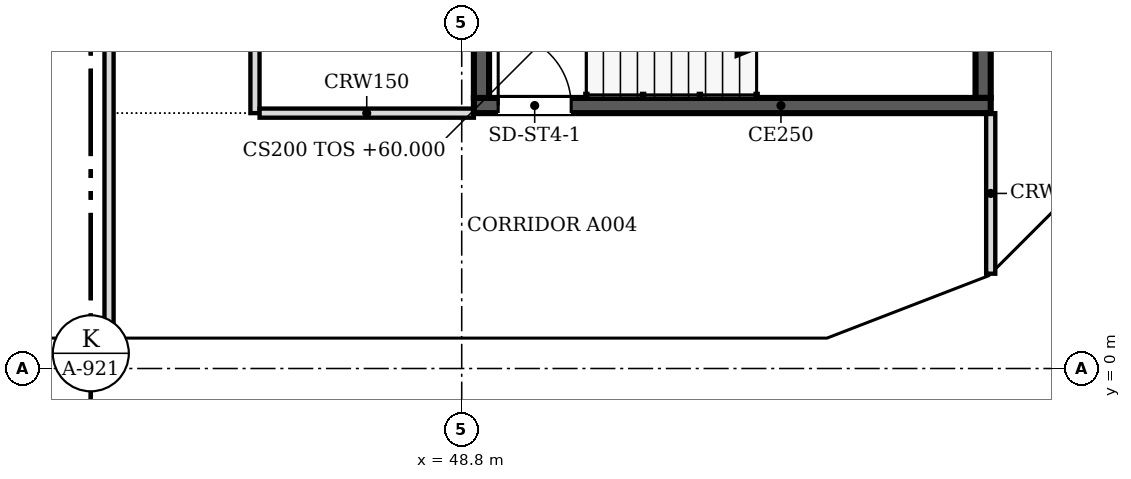
"""IFC4 building model, lengths in metres.
Left out: names, types, materials, properties, quantities, classifications, styles, units other than length and angle.
Written with IfcOpenShell. Run it as: python <this file> out.ifc"""

import sys

from ifc_helpers import new_model, si_unit, direction, frame, frame_2d, origin, place, context, subcontext, project, spatial, polyline, rectangle, outline, extrude, faceted_brep, source, transform, mapped, element, fill, save


model = new_model("IFC4")
c1 = context("Model", 3, precision=1e-05, world=origin(), true_north=direction((0.0, 1.0)))
c2 = subcontext(c1, "Body", "Model", "MODEL_VIEW")
j1 = project(units=[si_unit("LENGTHUNIT", "METRE"), si_unit("PLANEANGLEUNIT", "RADIAN")], contexts=[c1])
p1 = place(None, origin())
s1 = spatial("IfcSite", under=j1, at=p1, CompositionType="ELEMENT")
p2 = place(p1, origin())
s2 = spatial("IfcBuilding", under=s1, at=p2, CompositionType="ELEMENT")
p3 = place(p2, frame((0.0, 0.0, 60.0)))
s3 = spatial("IfcBuildingStorey", under=s2, at=p3, CompositionType="ELEMENT", Elevation=60.0)
m1 = source(origin(), c2, "Body", "Brep", [
    faceted_brep([(3.05, -0.25, 0.0), (6.1, -0.25, 3.8), (6.1, -0.25, 3.8), (3.05, -0.25, 7.6), (0.0, -0.25, 3.8), (0.0, 0.25, 3.8), (3.05, 0.25, 7.6), (6.1, 0.25, 3.8), (6.1, 0.25, 3.8), (3.05, 0.25, 0.0)], [[[0, 1, 2, 3, 4]], [[5, 6, 7, 8, 9]], [[9, 8, 1, 0]], [[7, 6, 3, 2]], [[6, 5, 4, 3]], [[5, 9, 0, 4]], [[1, 8, 7, 2]]]),
])
p4 = place(p3, frame((36.6, 0.25, -3.8), z_axis=(0.0, 0.0, 1.0), x_axis=(1.0, 0.0, 0.0)))
e1 = element("IfcWall", 1, at=p4, inside=s3, PredefinedType="SOLIDWALL", context=c2, shape_type="MappedRepresentation", body=[
    mapped(m1, transform((0.0, 0.0, 0.0), scale=1.0)),
])
m2 = source(origin(), c2, "Body", "SweptSolid", [
    extrude(outline(polyline([(3.05, 0.399), (5.78, 3.8), (3.05, 7.201), (0.321, 3.8), (3.05, 0.399)])), frame((0.0, 0.26, 0.0), z_axis=(0.0, -1.0, 0.0), x_axis=(1.0, 0.0, 0.0)), (0.0, 0.0, 1.0), 0.52),
])
p5 = place(p4, origin())
e2 = element("IfcOpeningElement", 2, at=p5, cuts=e1, PredefinedType="OPENING", context=c2, shape_type="MappedRepresentation", body=[
    mapped(m2, transform((0.0, 0.0, 0.0), scale=1.0)),
])
m3 = source(origin(), c2, "Body", "SweptSolid", [
    extrude(outline(polyline([(3.05, 0.0), (6.1, 3.8), (3.05, 7.6), (0.0, 3.8), (3.05, 0.0)])), frame((0.0, 0.25, 0.0), z_axis=(0.0, -1.0, 0.0), x_axis=(1.0, 0.0, 0.0)), (0.0, 0.0, 1.0), 0.5),
])
p6 = place(p3, frame((42.7, 0.25, -3.8), z_axis=(0.0, 0.0, 1.0), x_axis=(1.0, 0.0, 0.0)))
e3 = element("IfcWall", 3, at=p6, inside=s3, PredefinedType="SOLIDWALL", context=c2, shape_type="MappedRepresentation", body=[
    mapped(m3, transform((0.0, 0.0, 0.0), scale=1.0)),
])
p7 = place(p6, origin())
e4 = element("IfcOpeningElement", 4, at=p7, cuts=e3, PredefinedType="OPENING", context=c2, shape_type="MappedRepresentation", body=[
    mapped(m2, transform((0.0, 0.0, 0.0), scale=1.0)),
])
m4 = source(origin(), c2, "Body", "Brep", [
    faceted_brep([(3.05, -0.25, 0.0), (6.053, -0.25, 3.8), (3.05, -0.25, 7.6), (0.0, -0.25, 3.8), (0.0, 0.25, 3.8), (3.05, 0.25, 7.6), (6.007, 0.25, 3.859), (6.007, 0.25, 3.741), (3.05, 0.25, 0.0), (6.053, 0.0, 3.8)], [[[0, 1, 2, 3]], [[4, 5, 6, 7, 8]], [[8, 7, 9, 1, 0]], [[6, 5, 2, 1, 9]], [[5, 4, 3, 2]], [[4, 8, 0, 3]], [[9, 7, 6]]]),
])
p8 = place(p3, frame((48.8, 0.25, -3.8), z_axis=(0.0, 0.0, 1.0), x_axis=(1.0, 0.0, 0.0)))
e5 = element("IfcWall", 5, at=p8, inside=s3, PredefinedType="SOLIDWALL", context=c2, shape_type="MappedRepresentation", body=[
    mapped(m4, transform((0.0, 0.0, 0.0), scale=1.0)),
])
m5 = source(origin(), c2, "Body", "SweptSolid", [
    extrude(outline(polyline([(3.049, 0.401), (5.735, 3.8), (3.049, 7.199), (0.321, 3.8), (3.049, 0.401)])), frame((0.0, 0.26, 0.0), z_axis=(0.0, -1.0, 0.0), x_axis=(1.0, 0.0, 0.0)), (0.0, 0.0, 1.0), 0.52),
])
p9 = place(p8, origin())
e6 = element("IfcOpeningElement", 6, at=p9, cuts=e5, PredefinedType="OPENING", context=c2, shape_type="MappedRepresentation", body=[
    mapped(m5, transform((0.0, 0.0, 0.0), scale=1.0)),
])
m6 = source(origin(), c2, "Body", "Brep", [
    faceted_brep([(2.95, -0.25, 0.0), (3.003, -0.25, 0.068), (3.003, -0.25, 7.532), (2.95, -0.25, 7.6), (0.0, -0.25, 3.8), (0.047, 0.25, 3.86), (2.898, 0.25, 7.532), (2.898, 0.25, 0.068), (0.047, 0.25, 3.74), (2.95, 0.0, 0.0), (2.95, 0.0, 7.6), (0.0, 0.0, 3.8)], [[[0, 1, 2, 3, 4]], [[5, 6, 7, 8]], [[1, 0, 9]], [[10, 3, 2]], [[6, 5, 11, 4, 3, 10]], [[8, 7, 9, 0, 4, 11]], [[8, 11, 5]], [[1, 9, 7, 6, 10, 2]]]),
])
p10 = place(p3, frame((54.854, 0.25, -3.8), z_axis=(0.0, 0.0, 1.0), x_axis=(0.932970071518, 0.359953949349, 0.0)))
e7 = element("IfcWall", 7, at=p10, inside=s3, PredefinedType="SOLIDWALL", context=c2, shape_type="MappedRepresentation", body=[
    mapped(m6, transform((0.0, 0.0, 0.0), scale=1.0)),
])
m7 = source(origin(), c2, "Body", "SweptSolid", [
    extrude(outline(polyline([(2.75, 6.935), (0.316, 3.8), (2.75, 0.665), (2.75, 6.935)])), frame((0.0, 0.26, 0.0), z_axis=(0.0, -1.0, 0.0), x_axis=(1.0, 0.0, 0.0)), (0.0, 0.0, 1.0), 0.52),
])
p11 = place(p10, origin())
e8 = element("IfcOpeningElement", 8, at=p11, cuts=e7, PredefinedType="OPENING", context=c2, shape_type="MappedRepresentation", body=[
    mapped(m7, transform((0.0, 0.0, 0.0), scale=1.0)),
])
m8 = source(origin(), c2, "Body", "Brep", [
    faceted_brep([(0.053, -0.25, 0.0), (2.997, -0.25, 3.8), (0.053, -0.25, 7.6), (0.0, -0.25, 7.532), (0.0, -0.25, 0.068), (0.106, 0.25, 7.532), (2.944, 0.25, 3.868), (2.944, 0.25, 3.732), (0.106, 0.25, 0.068), (2.997, 0.0, 3.8), (0.053, 0.0, 0.0), (0.053, 0.0, 7.6)], [[[0, 1, 2, 3, 4]], [[5, 6, 7, 8]], [[8, 7, 9, 1, 0, 10]], [[6, 5, 11, 2, 1, 9]], [[3, 2, 11]], [[10, 0, 4]], [[8, 10, 4, 3, 11, 5]], [[9, 7, 6]]]),
])
p12 = place(p3, frame((57.569, 1.274, -3.8), z_axis=(0.0, 0.0, 1.0), x_axis=(0.707066050402, 0.707147509625, 0.0)))
e9 = element("IfcWall", 9, at=p12, inside=s3, PredefinedType="SOLIDWALL", context=c2, shape_type="MappedRepresentation", body=[
    mapped(m8, transform((0.0, 0.0, 0.0), scale=1.0)),
])
m9 = source(origin(), c2, "Body", "SweptSolid", [
    extrude(outline(polyline([(0.253, 0.666), (2.681, 3.8), (0.253, 6.934), (0.253, 0.666)])), frame((0.0, 0.26, 0.0), z_axis=(0.0, -1.0, 0.0), x_axis=(1.0, 0.0, 0.0)), (0.0, 0.0, 1.0), 0.52),
])
p13 = place(p12, origin())
e10 = element("IfcOpeningElement", 10, at=p13, cuts=e9, PredefinedType="OPENING", context=c2, shape_type="MappedRepresentation", body=[
    mapped(m9, transform((0.0, 0.0, 0.0), scale=1.0)),
])
m10 = source(origin(), c2, "Body", "SweptSolid", [
    extrude(outline(polyline([(3.05, 0.0), (6.1, 3.8), (0.0, 3.8), (3.05, 0.0)])), frame((0.0, 0.25, 0.0), z_axis=(0.0, -1.0, 0.0), x_axis=(1.0, 0.0, 0.0)), (0.0, 0.0, 1.0), 0.5),
])
p14 = place(p3, frame((39.65, 0.25, 0.0), z_axis=(0.0, 0.0, 1.0), x_axis=(1.0, 0.0, 0.0)))
e11 = element("IfcWall", 11, at=p14, inside=s3, PredefinedType="SOLIDWALL", context=c2, shape_type="MappedRepresentation", body=[
    mapped(m10, transform((0.0, 0.0, 0.0), scale=1.0)),
])
m11 = source(origin(), c2, "Body", "SweptSolid", [
    extrude(outline(polyline([(3.05, 0.399), (5.579, 3.55), (0.521, 3.55), (3.05, 0.399)])), frame((0.0, 0.26, 0.0), z_axis=(0.0, -1.0, 0.0), x_axis=(1.0, 0.0, 0.0)), (0.0, 0.0, 1.0), 0.52),
])
p15 = place(p14, origin())
e12 = element("IfcOpeningElement", 12, at=p15, cuts=e11, PredefinedType="OPENING", context=c2, shape_type="MappedRepresentation", body=[
    mapped(m11, transform((0.0, 0.0, 0.0), scale=1.0)),
])
p16 = place(p3, frame((45.75, 0.25, 0.0), z_axis=(0.0, 0.0, 1.0), x_axis=(1.0, 0.0, 0.0)))
e13 = element("IfcWall", 13, at=p16, inside=s3, PredefinedType="SOLIDWALL", context=c2, shape_type="MappedRepresentation", body=[
    mapped(m10, transform((0.0, 0.0, 0.0), scale=1.0)),
])
p17 = place(p16, origin())
e14 = element("IfcOpeningElement", 14, at=p17, cuts=e13, PredefinedType="OPENING", context=c2, shape_type="MappedRepresentation", body=[
    mapped(m11, transform((0.0, 0.0, 0.0), scale=1.0)),
])
m12 = source(origin(), c2, "Body", "Brep", [
    faceted_brep([(3.003, -0.25, 0.0), (3.05, -0.25, 0.06), (3.05, -0.25, 3.8), (0.0, -0.25, 3.8), (0.0, 0.25, 3.8), (2.957, 0.25, 3.8), (2.957, 0.25, 0.059), (3.003, 0.0, 0.0)], [[[0, 1, 2, 3]], [[4, 5, 6]], [[1, 0, 7]], [[5, 4, 3, 2]], [[4, 6, 7, 0, 3]], [[1, 7, 6, 5, 2]]]),
])
p18 = place(p3, frame((51.85, 0.25, 0.0), z_axis=(0.0, 0.0, 1.0), x_axis=(1.0, 0.0, 0.0)))
e15 = element("IfcWall", 15, at=p18, inside=s3, PredefinedType="SOLIDWALL", context=c2, shape_type="MappedRepresentation", body=[
    mapped(m12, transform((0.0, 0.0, 0.0), scale=1.0)),
])
m13 = source(origin(), c2, "Body", "SweptSolid", [
    extrude(outline(polyline([(2.803, 3.55), (0.516, 3.55), (2.803, 0.656), (2.803, 3.55)])), frame((0.0, 0.26, 0.0), z_axis=(0.0, -1.0, 0.0), x_axis=(1.0, 0.0, 0.0)), (0.0, 0.0, 1.0), 0.52),
])
p19 = place(p18, origin())
e16 = element("IfcOpeningElement", 16, at=p19, cuts=e15, PredefinedType="OPENING", context=c2, shape_type="MappedRepresentation", body=[
    mapped(m13, transform((0.0, 0.0, 0.0), scale=1.0)),
])
m14 = source(origin(), c2, "Body", "Brep", [
    faceted_brep([(0.047, -0.25, 0.0), (2.997, -0.25, 3.8), (0.0, -0.25, 3.8), (0.0, -0.25, 0.059), (0.093, 0.25, 3.8), (2.944, 0.25, 3.8), (2.944, 0.25, 3.732), (0.093, 0.25, 0.06), (2.997, 0.0, 3.8), (0.047, 0.0, 0.0)], [[[0, 1, 2, 3]], [[4, 5, 6, 7]], [[7, 6, 8, 1, 0, 9]], [[5, 4, 2, 1, 8]], [[9, 0, 3]], [[7, 9, 3, 2, 4]], [[6, 5, 8]]]),
])
p20 = place(p3, frame((54.81, 0.233, 0.0), z_axis=(0.0, 0.0, 1.0), x_axis=(0.932990326376, 0.359901446078, 0.0)))
e17 = element("IfcWall", 17, at=p20, inside=s3, PredefinedType="SOLIDWALL", context=c2, shape_type="MappedRepresentation", body=[
    mapped(m14, transform((0.0, 0.0, 0.0), scale=1.0)),
])
m15 = source(origin(), c2, "Body", "SweptSolid", [
    extrude(outline(polyline([(0.247, 0.665), (2.487, 3.55), (0.247, 3.55), (0.247, 0.665)])), frame((0.0, 0.26, 0.0), z_axis=(0.0, -1.0, 0.0), x_axis=(1.0, 0.0, 0.0)), (0.0, 0.0, 1.0), 0.52),
])
p21 = place(p20, origin())
e18 = element("IfcOpeningElement", 18, at=p21, cuts=e17, PredefinedType="OPENING", context=c2, shape_type="MappedRepresentation", body=[
    mapped(m15, transform((0.0, 0.0, 0.0), scale=1.0)),
])
m16 = source(origin(), c2, "Body", "Brep", [
    faceted_brep([(2.944, -0.25, 0.0), (2.997, -0.25, 0.068), (2.997, -0.25, 3.8), (0.0, -0.25, 3.8), (0.053, 0.25, 3.8), (2.891, 0.25, 3.8), (2.891, 0.25, 0.068), (0.053, 0.25, 3.732), (2.944, 0.0, 0.0), (0.0, 0.0, 3.8)], [[[0, 1, 2, 3]], [[4, 5, 6, 7]], [[1, 0, 8]], [[5, 4, 9, 3, 2]], [[7, 6, 8, 0, 3, 9]], [[7, 9, 4]], [[1, 8, 6, 5, 2]]]),
])
p22 = place(p3, frame((57.606, 1.312, 0.0), z_axis=(0.0, 0.0, 1.0), x_axis=(0.707147509625, 0.707066050402, 0.0)))
e19 = element("IfcWall", 19, at=p22, inside=s3, PredefinedType="SOLIDWALL", context=c2, shape_type="MappedRepresentation", body=[
    mapped(m16, transform((0.0, 0.0, 0.0), scale=1.0)),
])
m17 = source(origin(), c2, "Body", "SweptSolid", [
    extrude(outline(polyline([(2.744, 3.55), (0.51, 3.55), (2.744, 0.666), (2.744, 3.55)])), frame((0.0, 0.26, 0.0), z_axis=(0.0, -1.0, 0.0), x_axis=(1.0, 0.0, 0.0)), (0.0, 0.0, 1.0), 0.52),
])
p23 = place(p22, origin())
e20 = element("IfcOpeningElement", 20, at=p23, cuts=e19, PredefinedType="OPENING", context=c2, shape_type="MappedRepresentation", body=[
    mapped(m17, transform((0.0, 0.0, 0.0), scale=1.0)),
])
p24 = place(p3, frame((57.5, 4.325, 0.0), z_axis=(0.0, 0.0, 1.0), x_axis=(-1.0, 0.0, 0.0)))
e21 = element("IfcWall", 21, at=p24, inside=s3, PredefinedType="SOLIDWALL", context=c2, shape_type="SweptSolid", body=[
    extrude(rectangle(XDim=8.5, YDim=0.25, at=frame_2d((4.25, 0.0))), origin(), (0.0, 0.0, 1.0), 3.8),
])
m18 = source(origin(), c2, "Body", "SweptSolid", [
    extrude(rectangle(XDim=1.2, YDim=2.1, at=frame_2d((0.6, 1.05))), frame((0.0, 0.135, 0.0), z_axis=(0.0, -1.0, 0.0), x_axis=(1.0, 0.0, 0.0)), (0.0, 0.0, 1.0), 0.27),
])
p25 = place(p24, frame((6.9, 0.0, 0.0)))
e22 = element("IfcOpeningElement", 22, at=p25, cuts=e21, PredefinedType="OPENING", context=c2, shape_type="MappedRepresentation", body=[
    mapped(m18, transform((0.0, 0.0, 0.0), scale=1.0)),
])
for number, where, z_axis, x_axis in (
    (23, (49.125, 4.45, 0.0), (0.0, 0.0, 1.0), (0.0, 1.0, 0.0)),
    (24, (57.375, 7.85, 0.0), (0.0, 0.0, 1.0), (0.0, -1.0, 0.0)),
):
    element("IfcWall", number, at=place(p3, frame(where, z_axis=z_axis, x_axis=x_axis)), inside=s3, PredefinedType="SOLIDWALL", context=c2, shape_type="SweptSolid", body=[
        extrude(rectangle(XDim=3.4, YDim=0.25, at=frame_2d((1.7, 0.0))), origin(), (0.0, 0.0, 1.0), 3.8),
    ])
p26 = place(p3, frame((43.0, 0.5, 0.0), z_axis=(0.0, 0.0, 1.0), x_axis=(0.0, 1.0, 0.0)))
e25 = element("IfcWall", 25, at=p26, inside=s3, PredefinedType="PARTITIONING", context=c2, shape_type="SweptSolid", body=[
    extrude(rectangle(XDim=21.424, YDim=0.15, at=frame_2d((10.712, 0.0))), origin(), (0.0, 0.0, 1.0), 2.888),
])
m19 = source(origin(), c2, "Body", "SweptSolid", [
    extrude(rectangle(XDim=1.0, YDim=2.1, at=frame_2d((0.5, 1.05))), frame((0.0, 0.085, 0.0), z_axis=(0.0, -1.0, 0.0), x_axis=(1.0, 0.0, 0.0)), (0.0, 0.0, 1.0), 0.17),
])
p27 = place(p26, frame((16.601, 0.0, 0.0)))
e26 = element("IfcOpeningElement", 26, at=p27, cuts=e25, PredefinedType="OPENING", context=c2, shape_type="MappedRepresentation", body=[
    mapped(m19, transform((0.0, 0.0, 0.0), scale=1.0)),
])
p28 = place(p26, frame((7.7, 0.0, 0.0)))
e27 = element("IfcOpeningElement", 27, at=p28, cuts=e25, PredefinedType="OPENING", context=c2, shape_type="MappedRepresentation", body=[
    mapped(m19, transform((0.0, 0.0, 0.0), scale=1.0)),
])
p29 = place(p3, frame((57.5, 1.559, 0.0), z_axis=(0.0, 0.0, 1.0), x_axis=(0.0, 1.0, 0.0)))
e28 = element("IfcWall", 28, at=p29, inside=s3, PredefinedType="PARTITIONING", context=c2, shape_type="SweptSolid", body=[
    extrude(rectangle(XDim=2.641, YDim=0.15, at=frame_2d((1.32, 0.0))), origin(), (0.0, 0.0, 1.0), 2.888),
])
p30 = place(p3, frame((45.4, 22.0, 0.0), z_axis=(0.0, 0.0, 1.0), x_axis=(0.0, -1.0, 0.0)))
e29 = element("IfcWall", 29, at=p30, inside=s3, PredefinedType="PARTITIONING", context=c2, shape_type="SweptSolid", body=[
    extrude(rectangle(XDim=17.8, YDim=0.15, at=frame_2d((8.9, 0.0))), origin(), (0.0, 0.0, 1.0), 2.888),
])
p31 = place(p30, frame((3.499, 0.0, 0.0)))
e30 = element("IfcOpeningElement", 30, at=p31, cuts=e29, PredefinedType="OPENING", context=c2, shape_type="MappedRepresentation", body=[
    mapped(m19, transform((0.0, 0.0, 0.0), scale=1.0)),
])
m20 = source(origin(), c2, "Body", "SweptSolid", [
    extrude(rectangle(XDim=0.9, YDim=2.1, at=frame_2d((0.45, 1.05))), frame((0.0, 0.085, 0.0), z_axis=(0.0, -1.0, 0.0), x_axis=(1.0, 0.0, 0.0)), (0.0, 0.0, 1.0), 0.17),
])
p32 = place(p30, frame((12.4, 0.0, 0.0)))
e31 = element("IfcOpeningElement", 31, at=p32, cuts=e29, PredefinedType="OPENING", context=c2, shape_type="MappedRepresentation", body=[
    mapped(m20, transform((0.0, 0.0, 0.0), scale=1.0)),
])
p33 = place(p3, frame((45.476, 4.2, 0.0), z_axis=(0.0, 0.0, 1.0), x_axis=(1.0, 0.0, 0.0)))
e32 = element("IfcWall", 32, at=p33, inside=s3, PredefinedType="PARTITIONING", context=c2, shape_type="SweptSolid", body=[
    extrude(rectangle(XDim=3.524, YDim=0.15, at=frame_2d((1.762, 0.0))), origin(), (0.0, 0.0, 1.0), 2.888),
])
m21 = source(origin(), c2, "Body", "SweptSolid", [
    extrude(rectangle(XDim=1.2, YDim=2.1, at=frame_2d((0.6, 1.05))), frame((0.0, 0.025, 0.0), z_axis=(0.0, -1.0, 0.0), x_axis=(1.0, 0.0, 0.0)), (0.0, 0.0, 1.0), 0.05),
])
p34 = place(p25, origin())
e33 = element("IfcDoor", 33, at=p34, inside=s3, OperationType="SINGLE_SWING_RIGHT", PredefinedType="DOOR", context=c2, shape_type="MappedRepresentation", body=[
    mapped(m21, transform((0.0, 0.0, 0.0), scale=1.0)),
])
fill(e22, e33)
save(model, sys.argv[1])
